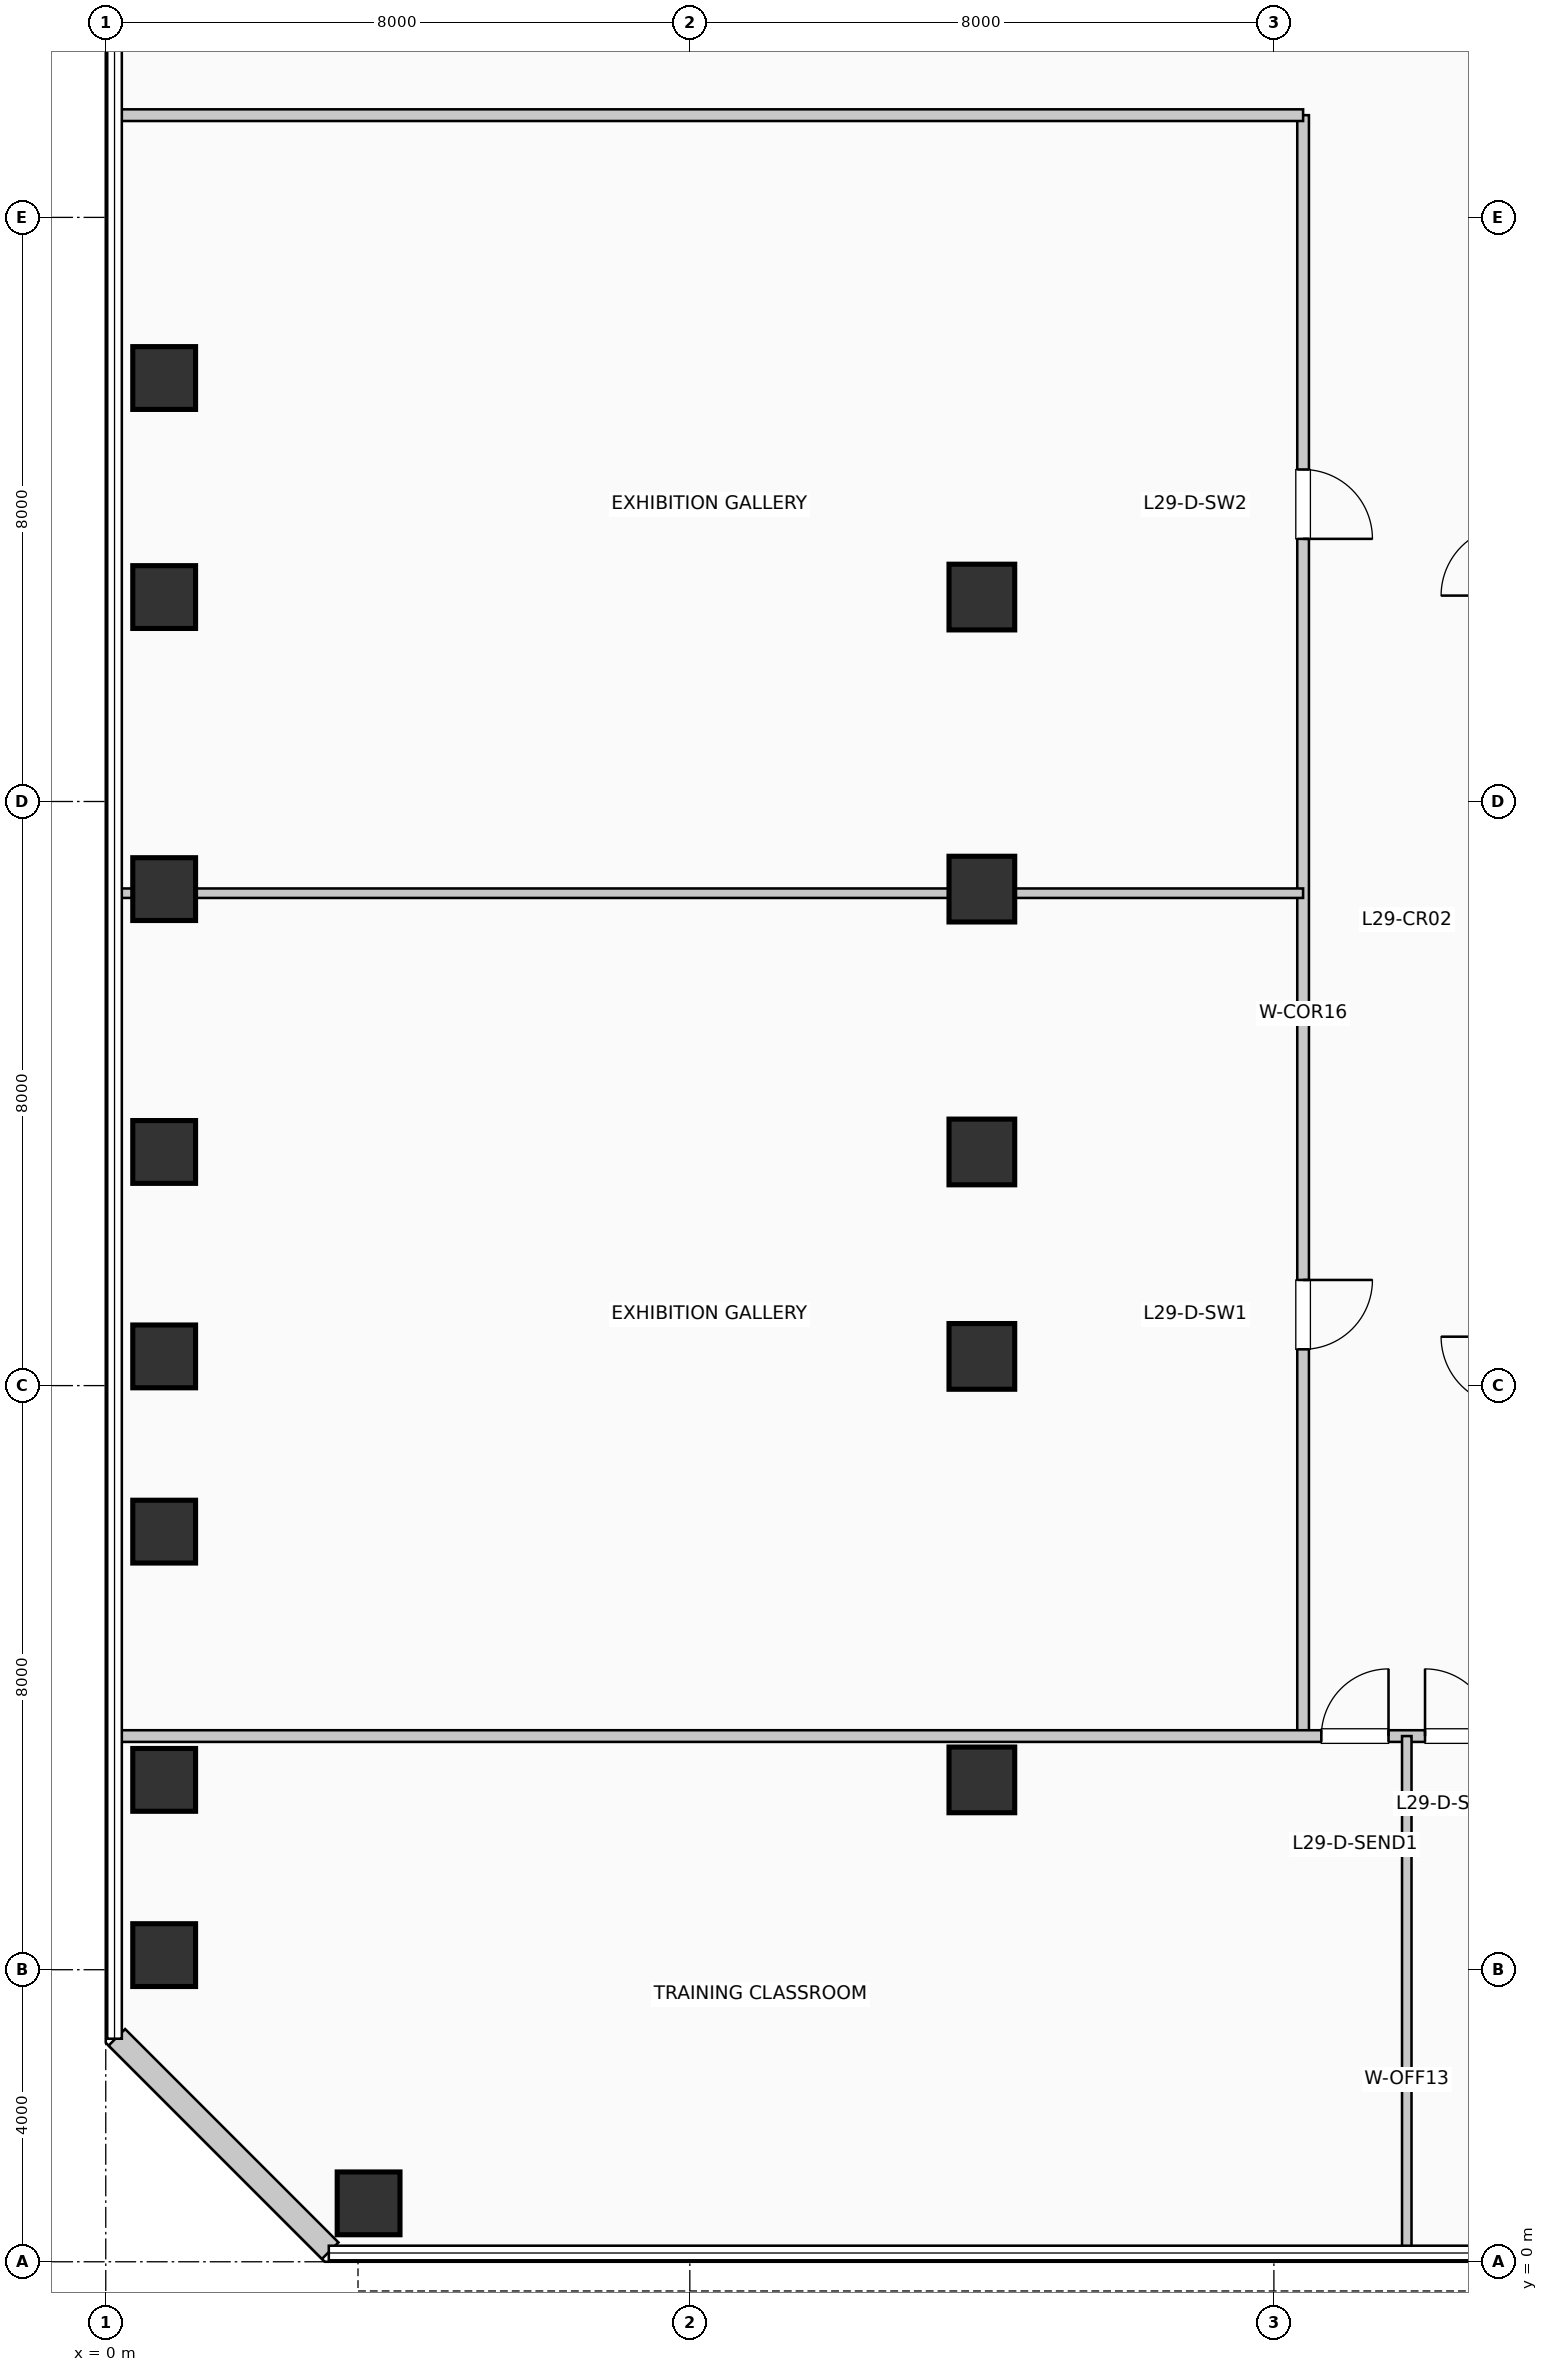
"""IFC4 building model, lengths in metres.
Left out: names, types, materials, properties, quantities, classifications, styles, units other than length and angle.
Written with IfcOpenShell. Run it as: python <this file> out.ifc"""

import sys

from ifc_helpers import new_model, si_unit, direction, frame, frame_2d, origin, origin_2d, place, context, subcontext, project, spatial, rectangle, extrude, element, fill, save


model = new_model("IFC4")
c1 = context("Model", 3, precision=1e-05, world=origin(), true_north=direction((0.0, 1.0)))
c2 = subcontext(c1, "Body", "Model", "MODEL_VIEW")
j1 = project(units=[si_unit("LENGTHUNIT", "METRE"), si_unit("PLANEANGLEUNIT", "RADIAN")], contexts=[c1])
p1 = place(None, origin())
s1 = spatial("IfcSite", under=j1, at=p1, CompositionType="ELEMENT")
p2 = place(p1, origin())
s2 = spatial("IfcBuilding", under=s1, at=p2, CompositionType="ELEMENT")
p3 = place(p2, frame((0.0, 0.0, 122.43)))
s3 = spatial("IfcBuildingStorey", under=s2, at=p3, CompositionType="ELEMENT", Elevation=122.43)
for number, where, z_axis, x_axis in (
    (1, (0.8, 4.2, 0.0), (0.0, 0.0, 1.0), (1.0, 0.0, 0.0)),
    (2, (0.8, 6.6, 0.0), (0.0, 0.0, 1.0), (1.0, 0.0, 0.0)),
    (3, (0.8, 10.0, 0.0), (0.0, 0.0, 1.0), (1.0, 0.0, 0.0)),
    (4, (0.8, 12.4, 0.0), (0.0, 0.0, 1.0), (1.0, 0.0, 0.0)),
    (5, (0.8, 15.2, 0.0), (0.0, 0.0, 1.0), (1.0, 0.0, 0.0)),
    (6, (0.8, 18.8, 0.0), (0.0, 0.0, 1.0), (1.0, 0.0, 0.0)),
    (7, (0.8, 22.8, 0.0), (0.0, 0.0, 1.0), (1.0, 0.0, 0.0)),
    (8, (0.8, 25.8, 0.0), (0.0, 0.0, 1.0), (1.0, 0.0, 0.0)),
    (9, (3.6, 0.8, 0.0), (0.0, 0.0, 1.0), (1.0, 0.0, 0.0)),
):
    element("IfcColumn", number, at=place(p3, frame(where, z_axis=z_axis, x_axis=x_axis)), inside=s3, PredefinedType="COLUMN", context=c2, shape_type="SweptSolid", body=[
        extrude(rectangle(XDim=0.86, YDim=0.86, at=origin_2d()), origin(), (0.0, 0.0, 1.0), 3.96),
    ])
for number, where, z_axis, x_axis in (
    (10, (12.0, 6.6, 0.0), (0.0, 0.0, 1.0), (1.0, 0.0, 0.0)),
    (11, (12.0, 12.4, 0.0), (0.0, 0.0, 1.0), (1.0, 0.0, 0.0)),
    (12, (12.0, 15.2, 0.0), (0.0, 0.0, 1.0), (1.0, 0.0, 0.0)),
    (13, (12.0, 18.8, 0.0), (0.0, 0.0, 1.0), (1.0, 0.0, 0.0)),
    (14, (12.0, 22.8, 0.0), (0.0, 0.0, 1.0), (1.0, 0.0, 0.0)),
):
    element("IfcColumn", number, at=place(p3, frame(where, z_axis=z_axis, x_axis=x_axis)), inside=s3, PredefinedType="COLUMN", context=c2, shape_type="SweptSolid", body=[
        extrude(rectangle(XDim=0.9, YDim=0.9, at=origin_2d()), origin(), (0.0, 0.0, 1.0), 3.96),
    ])
p4 = place(p3, frame((0.152, 3.074, 0.0), z_axis=(0.0, 0.0, 1.0), x_axis=(0.707106781187, -0.707106781187, 0.0)))
e15 = element("IfcWall", 15, at=p4, inside=s3, PredefinedType="SOLIDWALL", context=c2, shape_type="SweptSolid", body=[
    extrude(rectangle(XDim=4.133, YDim=0.32, at=frame_2d((2.066, 0.0))), origin(), (0.0, 0.0, 1.0), 3.71),
])
p5 = place(p3, frame((16.4, 7.2, 0.0), z_axis=(0.0, 0.0, 1.0), x_axis=(0.0, 1.0, 0.0)))
e16 = element("IfcWall", 16, at=p5, inside=s3, PredefinedType="PARTITIONING", context=c2, shape_type="SweptSolid", body=[
    extrude(rectangle(XDim=22.2, YDim=0.16, at=frame_2d((11.1, 0.0))), origin(), (0.0, 0.0, 1.0), 3.71),
])
p6 = place(p5, frame((6.247, 0.0, 0.0), z_axis=(0.0, 0.0, 1.0), x_axis=(-1.0, 0.0, 0.0)))
e17 = element("IfcOpeningElement", 17, at=p6, cuts=e16, PredefinedType="OPENING", context=c2, shape_type="SweptSolid", body=[
    extrude(rectangle(XDim=0.95, YDim=2.15, at=frame_2d((0.475, 1.075))), frame((0.0, 0.09, 0.0), z_axis=(0.0, -1.0, 0.0), x_axis=(1.0, 0.0, 0.0)), (0.0, 0.0, 1.0), 0.18),
])
p7 = place(p5, frame((17.347, 0.0, 0.0), z_axis=(0.0, 0.0, 1.0), x_axis=(-1.0, 0.0, 0.0)))
e18 = element("IfcOpeningElement", 18, at=p7, cuts=e16, PredefinedType="OPENING", context=c2, shape_type="SweptSolid", body=[
    extrude(rectangle(XDim=0.95, YDim=2.15, at=frame_2d((0.475, 1.075))), frame((0.0, 0.09, 0.0), z_axis=(0.0, -1.0, 0.0), x_axis=(1.0, 0.0, 0.0)), (0.0, 0.0, 1.0), 0.18),
])
p8 = place(p3, frame((0.19, 7.2, 0.0), z_axis=(0.0, 0.0, 1.0), x_axis=(1.0, 0.0, 0.0)))
e19 = element("IfcWall", 19, at=p8, inside=s3, PredefinedType="PARTITIONING", context=c2, shape_type="SweptSolid", body=[
    extrude(rectangle(XDim=23.26, YDim=0.16, at=frame_2d((11.63, 0.0))), origin(), (0.0, 0.0, 1.0), 3.71),
])
p9 = place(p8, frame((16.46, 0.0, 0.0)))
e20 = element("IfcOpeningElement", 20, at=p9, cuts=e19, PredefinedType="OPENING", context=c2, shape_type="SweptSolid", body=[
    extrude(rectangle(XDim=0.92, YDim=2.1, at=frame_2d((0.46, 1.05))), frame((0.0, 0.09, 0.0), z_axis=(0.0, -1.0, 0.0), x_axis=(1.0, 0.0, 0.0)), (0.0, 0.0, 1.0), 0.18),
])
p10 = place(p8, frame((17.88, 0.0, 0.0)))
e21 = element("IfcOpeningElement", 21, at=p10, cuts=e19, PredefinedType="OPENING", context=c2, shape_type="SweptSolid", body=[
    extrude(rectangle(XDim=0.92, YDim=2.1, at=frame_2d((0.46, 1.05))), frame((0.0, 0.09, 0.0), z_axis=(0.0, -1.0, 0.0), x_axis=(1.0, 0.0, 0.0)), (0.0, 0.0, 1.0), 0.18),
])
p11 = place(p3, frame((0.19, 29.4, 0.0), z_axis=(0.0, 0.0, 1.0), x_axis=(1.0, 0.0, 0.0)))
e22 = element("IfcWall", 22, at=p11, inside=s3, PredefinedType="PARTITIONING", context=c2, shape_type="SweptSolid", body=[
    extrude(rectangle(XDim=16.21, YDim=0.16, at=frame_2d((8.105, 0.0))), origin(), (0.0, 0.0, 1.0), 3.365),
])
p12 = place(p3, frame((17.82, 0.19, 0.0), z_axis=(0.0, 0.0, 1.0), x_axis=(0.0, 1.0, 0.0)))
e23 = element("IfcWall", 23, at=p12, inside=s3, PredefinedType="PARTITIONING", context=c2, shape_type="SweptSolid", body=[
    extrude(rectangle(XDim=7.01, YDim=0.13, at=frame_2d((3.505, 0.0))), origin(), (0.0, 0.0, 1.0), 3.71),
])
p13 = place(p3, frame((0.19, 18.744, 0.0), z_axis=(0.0, 0.0, 1.0), x_axis=(1.0, 0.0, 0.0)))
e24 = element("IfcWall", 24, at=p13, inside=s3, PredefinedType="PARTITIONING", context=c2, shape_type="SweptSolid", body=[
    extrude(rectangle(XDim=16.21, YDim=0.13, at=frame_2d((8.105, 0.0))), origin(), (0.0, 0.0, 1.0), 3.045),
])
p14 = place(p9, origin())
e25 = element("IfcDoor", 25, at=p14, inside=s3, OperationType="SINGLE_SWING_RIGHT", PredefinedType="DOOR", context=c2, shape_type="SweptSolid", body=[
    extrude(rectangle(XDim=0.92, YDim=2.1, at=frame_2d((0.46, 1.05))), frame((0.0, 0.025, 0.0), z_axis=(0.0, -1.0, 0.0), x_axis=(1.0, 0.0, 0.0)), (0.0, 0.0, 1.0), 0.05),
])
fill(e20, e25)
p15 = place(p10, origin())
e26 = element("IfcDoor", 26, at=p15, inside=s3, OperationType="SINGLE_SWING_LEFT", PredefinedType="DOOR", context=c2, shape_type="SweptSolid", body=[
    extrude(rectangle(XDim=0.92, YDim=2.1, at=frame_2d((0.46, 1.05))), frame((0.0, 0.025, 0.0), z_axis=(0.0, -1.0, 0.0), x_axis=(1.0, 0.0, 0.0)), (0.0, 0.0, 1.0), 0.05),
])
fill(e21, e26)
p16 = place(p6, origin())
e27 = element("IfcDoor", 27, at=p16, inside=s3, OperationType="SINGLE_SWING_RIGHT", PredefinedType="DOOR", context=c2, shape_type="SweptSolid", body=[
    extrude(rectangle(XDim=0.95, YDim=2.15, at=frame_2d((0.475, 1.075))), frame((0.0, 0.025, 0.0), z_axis=(0.0, -1.0, 0.0), x_axis=(1.0, 0.0, 0.0)), (0.0, 0.0, 1.0), 0.05),
])
fill(e17, e27)
p17 = place(p7, origin())
e28 = element("IfcDoor", 28, at=p17, inside=s3, OperationType="SINGLE_SWING_LEFT", PredefinedType="DOOR", context=c2, shape_type="SweptSolid", body=[
    extrude(rectangle(XDim=0.95, YDim=2.15, at=frame_2d((0.475, 1.075))), frame((0.0, 0.025, 0.0), z_axis=(0.0, -1.0, 0.0), x_axis=(1.0, 0.0, 0.0)), (0.0, 0.0, 1.0), 0.05),
])
fill(e18, e28)
save(model, sys.argv[1])
